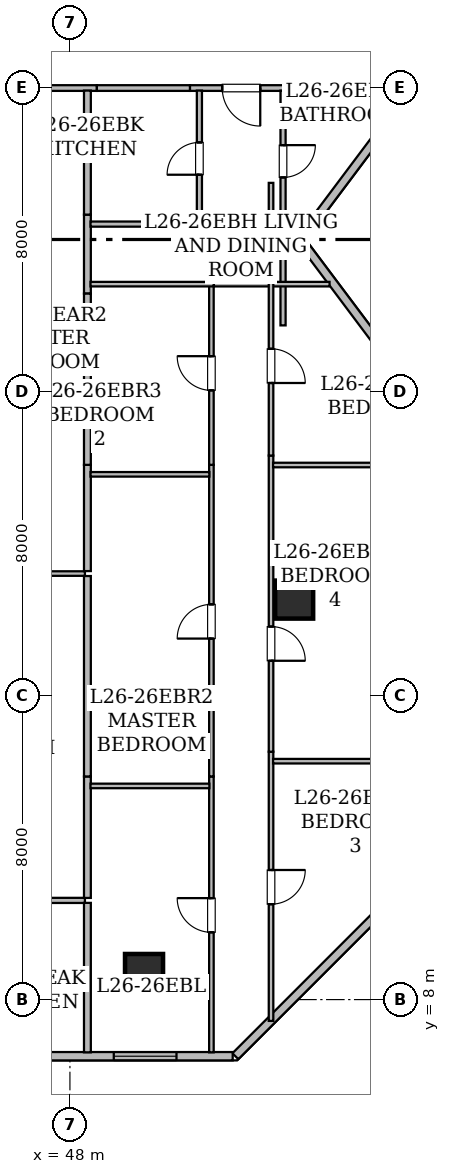
"""IFC4 building model, lengths in metres.
Left out: names, types, materials, properties, quantities, classifications, styles, units other than length and angle.
Written with IfcOpenShell. Run it as: python <this file> out.ifc"""

import sys

from ifc_helpers import new_model, si_unit, direction, frame, frame_2d, origin, origin_2d, place, context, subcontext, project, spatial, rectangle, hollow_rectangle, extrude, element, fill, save


model = new_model("IFC4")
c1 = context("Model", 3, precision=1e-05, world=origin(), true_north=direction((0.0, 1.0)))
c2 = subcontext(c1, "Body", "Model", "MODEL_VIEW")
j1 = project(units=[si_unit("LENGTHUNIT", "METRE"), si_unit("PLANEANGLEUNIT", "RADIAN")], contexts=[c1])
p1 = place(None, origin())
s1 = spatial("IfcSite", under=j1, at=p1, CompositionType="ELEMENT")
p2 = place(p1, origin())
s2 = spatial("IfcBuilding", under=s1, at=p2, CompositionType="ELEMENT")
p3 = place(p2, frame((0.0, 0.0, 105.55)))
s3 = spatial("IfcBuildingStorey", under=s2, at=p3, CompositionType="ELEMENT", Elevation=105.55)
for number, where, z_axis, x_axis in (
    (1, (49.95, 8.7, 0.0), (0.0, 0.0, 1.0), (1.0, 0.0, 0.0)),
    (2, (53.9, 18.525, 0.0), (0.0, 0.0, 1.0), (1.0, 0.0, 0.0)),
):
    element("IfcColumn", number, at=place(p3, frame(where, z_axis=z_axis, x_axis=x_axis)), inside=s3, PredefinedType="COLUMN", context=c2, shape_type="SweptSolid", body=[
        extrude(hollow_rectangle(XDim=1.0, YDim=1.0, WallThickness=0.05, at=origin_2d()), origin(), (0.0, 0.0, 1.0), 3.65),
    ])
p4 = place(p3, frame((56.456, 31.191, 0.0), z_axis=(0.0, 0.0, 1.0), x_axis=(-0.600137081448, -0.799897170561, 0.0)))
e3 = element("IfcWall", 3, at=p4, inside=s3, PredefinedType="STANDARD", context=c2, shape_type="SweptSolid", body=[
    extrude(rectangle(XDim=3.989, YDim=0.22, at=frame_2d((1.995, 0.0))), origin(), (0.0, 0.0, 1.0), 3.43),
])
p5 = place(p3, frame((54.119, 27.924, 0.0), z_axis=(0.0, 0.0, 1.0), x_axis=(0.600039540588, -0.799970343032, 0.0)))
e4 = element("IfcWall", 4, at=p5, inside=s3, PredefinedType="STANDARD", context=c2, shape_type="SweptSolid", body=[
    extrude(rectangle(XDim=3.952, YDim=0.22, at=frame_2d((1.976, 0.0))), origin(), (0.0, 0.0, 1.0), 3.43),
])
p6 = place(p3, frame((56.44, 10.596, 0.0), z_axis=(0.0, 0.0, 1.0), x_axis=(-0.707106781187, -0.707106781187, 0.0)))
e5 = element("IfcWall", 5, at=p6, inside=s3, PredefinedType="STANDARD", context=c2, shape_type="SweptSolid", body=[
    extrude(rectangle(XDim=5.778, YDim=0.22, at=frame_2d((2.889, 0.0))), origin(), (0.0, 0.0, 1.0), 3.43),
])
p7 = place(p3, frame((52.283, 6.51, 0.0), z_axis=(0.0, 0.0, 1.0), x_axis=(-1.0, 0.0, 0.0)))
e6 = element("IfcWall", 6, at=p7, inside=s3, PredefinedType="STANDARD", context=c2, shape_type="SweptSolid", body=[
    extrude(rectangle(XDim=38.568, YDim=0.22, at=frame_2d((19.284, 0.0))), origin(), (0.0, 0.0, 1.0), 3.43),
])
p8 = place(p7, frame((21.108, 0.0, 0.85)))
e7 = element("IfcOpeningElement", 7, at=p8, cuts=e6, PredefinedType="OPENING", context=c2, shape_type="SweptSolid", body=[
    extrude(rectangle(XDim=1.65, YDim=1.55, at=frame_2d((0.825, 0.775))), frame((0.0, 0.12, 0.0), z_axis=(0.0, -1.0, 0.0), x_axis=(1.0, 0.0, 0.0)), (0.0, 0.0, 1.0), 0.24),
])
p9 = place(p7, frame((35.355, 0.0, 0.85)))
e8 = element("IfcOpeningElement", 8, at=p9, cuts=e6, PredefinedType="OPENING", context=c2, shape_type="SweptSolid", body=[
    extrude(rectangle(XDim=1.65, YDim=1.55, at=frame_2d((0.825, 0.775))), frame((0.0, 0.12, 0.0), z_axis=(0.0, -1.0, 0.0), x_axis=(1.0, 0.0, 0.0)), (0.0, 0.0, 1.0), 0.24),
])
p10 = place(p7, frame((29.413, 0.0, 0.8)))
e9 = element("IfcOpeningElement", 9, at=p10, cuts=e6, PredefinedType="OPENING", context=c2, shape_type="SweptSolid", body=[
    extrude(rectangle(XDim=1.2, YDim=1.5, at=frame_2d((0.6, 0.75))), frame((0.0, 0.12, 0.0), z_axis=(0.0, -1.0, 0.0), x_axis=(1.0, 0.0, 0.0)), (0.0, 0.0, 1.0), 0.24),
])
p11 = place(p7, frame((31.863, 0.0, 0.85)))
e10 = element("IfcOpeningElement", 10, at=p11, cuts=e6, PredefinedType="OPENING", context=c2, shape_type="SweptSolid", body=[
    extrude(rectangle(XDim=1.65, YDim=1.55, at=frame_2d((0.825, 0.775))), frame((0.0, 0.12, 0.0), z_axis=(0.0, -1.0, 0.0), x_axis=(1.0, 0.0, 0.0)), (0.0, 0.0, 1.0), 0.24),
])
p12 = place(p7, frame((26.513, 0.0, 0.85)))
e11 = element("IfcOpeningElement", 11, at=p12, cuts=e6, PredefinedType="OPENING", context=c2, shape_type="SweptSolid", body=[
    extrude(rectangle(XDim=1.65, YDim=1.55, at=frame_2d((0.825, 0.775))), frame((0.0, 0.12, 0.0), z_axis=(0.0, -1.0, 0.0), x_axis=(1.0, 0.0, 0.0)), (0.0, 0.0, 1.0), 0.24),
])
p13 = place(p7, frame((13.843, 0.0, 0.85)))
e12 = element("IfcOpeningElement", 12, at=p13, cuts=e6, PredefinedType="OPENING", context=c2, shape_type="SweptSolid", body=[
    extrude(rectangle(XDim=1.65, YDim=1.55, at=frame_2d((0.825, 0.775))), frame((0.0, 0.12, 0.0), z_axis=(0.0, -1.0, 0.0), x_axis=(1.0, 0.0, 0.0)), (0.0, 0.0, 1.0), 0.24),
])
p14 = place(p7, frame((1.479, 0.0, 0.85)))
e13 = element("IfcOpeningElement", 13, at=p14, cuts=e6, PredefinedType="OPENING", context=c2, shape_type="SweptSolid", body=[
    extrude(rectangle(XDim=1.65, YDim=1.55, at=frame_2d((0.825, 0.775))), frame((0.0, 0.12, 0.0), z_axis=(0.0, -1.0, 0.0), x_axis=(1.0, 0.0, 0.0)), (0.0, 0.0, 1.0), 0.24),
])
p15 = place(p3, frame((48.709, 31.985, 0.0), z_axis=(0.0, 0.0, 1.0), x_axis=(-1.0, 0.0, 0.0)))
e14 = element("IfcWall", 14, at=p15, inside=s3, PredefinedType="STANDARD", context=c2, shape_type="SweptSolid", body=[
    extrude(rectangle(XDim=3.906, YDim=0.15, at=frame_2d((1.953, 0.0))), origin(), (0.0, 0.0, 1.0), 2.647),
])
p16 = place(p3, frame((53.857, 31.985, 0.0), z_axis=(0.0, 0.0, 1.0), x_axis=(-1.0, 0.0, 0.0)))
e15 = element("IfcWall", 15, at=p16, inside=s3, PredefinedType="STANDARD", context=c2, shape_type="SweptSolid", body=[
    extrude(rectangle(XDim=2.699, YDim=0.15, at=frame_2d((1.35, 0.0))), origin(), (0.0, 0.0, 1.0), 2.876),
])
p17 = place(p16, frame((0.849, 0.0, 0.0)))
e16 = element("IfcOpeningElement", 16, at=p17, cuts=e15, PredefinedType="OPENING", context=c2, shape_type="SweptSolid", body=[
    extrude(rectangle(XDim=1.0, YDim=2.15, at=frame_2d((0.5, 1.075))), frame((0.0, 0.085, 0.0), z_axis=(0.0, -1.0, 0.0), x_axis=(1.0, 0.0, 0.0)), (0.0, 0.0, 1.0), 0.17),
])
p18 = place(p3, frame((56.388, 31.985, 0.0), z_axis=(0.0, 0.0, 1.0), x_axis=(-1.0, 0.0, 0.0)))
e17 = element("IfcWall", 17, at=p18, inside=s3, PredefinedType="STANDARD", context=c2, shape_type="SweptSolid", body=[
    extrude(rectangle(XDim=2.531, YDim=0.15, at=frame_2d((1.266, 0.0))), origin(), (0.0, 0.0, 1.0), 2.876),
])
p19 = place(p3, frame((51.158, 31.985, 0.0), z_axis=(0.0, 0.0, 1.0), x_axis=(-1.0, 0.0, 0.0)))
e18 = element("IfcWall", 18, at=p19, inside=s3, PredefinedType="STANDARD", context=c2, shape_type="SweptSolid", body=[
    extrude(rectangle(XDim=2.449, YDim=0.15, at=frame_2d((1.225, 0.0))), origin(), (0.0, 0.0, 1.0), 3.43),
])
p20 = place(p3, frame((44.803, 19.21, 0.0), z_axis=(0.0, 0.0, 1.0), x_axis=(1.0, 0.0, 0.0)))
e19 = element("IfcWall", 19, at=p20, inside=s3, PredefinedType="PARTITIONING", context=c2, shape_type="SweptSolid", body=[
    extrude(rectangle(XDim=3.592, YDim=0.12, at=frame_2d((1.796, 0.0))), origin(), (0.0, 0.0, 1.0), 2.647),
])
p21 = place(p20, frame((0.397, 0.0, 0.0)))
e20 = element("IfcOpeningElement", 20, at=p21, cuts=e19, PredefinedType="OPENING", context=c2, shape_type="SweptSolid", body=[
    extrude(rectangle(XDim=0.9, YDim=2.1, at=frame_2d((0.45, 1.05))), frame((0.0, 0.07, 0.0), z_axis=(0.0, -1.0, 0.0), x_axis=(1.0, 0.0, 0.0)), (0.0, 0.0, 1.0), 0.14),
])
p22 = place(p3, frame((48.395, 10.61, 0.0), z_axis=(0.0, 0.0, 1.0), x_axis=(-1.0, 0.0, 0.0)))
e21 = element("IfcWall", 21, at=p22, inside=s3, PredefinedType="PARTITIONING", context=c2, shape_type="SweptSolid", body=[
    extrude(rectangle(XDim=4.166, YDim=0.135, at=frame_2d((2.083, 0.0))), origin(), (0.0, 0.0, 1.0), 3.43),
])
p23 = place(p22, frame((1.658, 0.0, 0.0)))
e22 = element("IfcOpeningElement", 22, at=p23, cuts=e21, PredefinedType="OPENING", context=c2, shape_type="SweptSolid", body=[
    extrude(rectangle(XDim=0.85, YDim=2.1, at=frame_2d((0.425, 1.05))), frame((0.0, 0.077, 0.0), z_axis=(0.0, -1.0, 0.0), x_axis=(1.0, 0.0, 0.0)), (0.0, 0.0, 1.0), 0.155),
])
p24 = place(p3, frame((48.46, 13.871, 0.0), z_axis=(0.0, 0.0, 1.0), x_axis=(0.0, -1.0, 0.0)))
e23 = element("IfcWall", 23, at=p24, inside=s3, PredefinedType="STANDARD", context=c2, shape_type="SweptSolid", body=[
    extrude(rectangle(XDim=3.196, YDim=0.18, at=frame_2d((1.598, 0.0))), origin(), (0.0, 0.0, 1.0), 2.647),
])
p25 = place(p3, frame((48.46, 19.145, 0.0), z_axis=(0.0, 0.0, 1.0), x_axis=(0.0, -1.0, 0.0)))
e24 = element("IfcWall", 24, at=p25, inside=s3, PredefinedType="STANDARD", context=c2, shape_type="SweptSolid", body=[
    extrude(rectangle(XDim=5.274, YDim=0.18, at=frame_2d((2.637, 0.0))), origin(), (0.0, 0.0, 1.0), 2.647),
])
p26 = place(p3, frame((48.46, 28.654, 0.0), z_axis=(0.0, 0.0, 1.0), x_axis=(0.0, -1.0, 0.0)))
e25 = element("IfcWall", 25, at=p26, inside=s3, PredefinedType="STANDARD", context=c2, shape_type="SweptSolid", body=[
    extrude(rectangle(XDim=2.078, YDim=0.18, at=frame_2d((1.039, 0.0))), origin(), (0.0, 0.0, 1.0), 3.43),
])
p27 = place(p3, frame((48.46, 31.918, 0.0), z_axis=(0.0, 0.0, 1.0), x_axis=(0.0, -1.0, 0.0)))
e26 = element("IfcWall", 26, at=p27, inside=s3, PredefinedType="STANDARD", context=c2, shape_type="SweptSolid", body=[
    extrude(rectangle(XDim=3.264, YDim=0.18, at=frame_2d((1.632, 0.0))), origin(), (0.0, 0.0, 1.0), 3.43),
])
p28 = place(p3, frame((48.46, 22.07, 0.0), z_axis=(0.0, 0.0, 1.0), x_axis=(0.0, -1.0, 0.0)))
e27 = element("IfcWall", 27, at=p28, inside=s3, PredefinedType="STANDARD", context=c2, shape_type="SweptSolid", body=[
    extrude(rectangle(XDim=2.795, YDim=0.18, at=frame_2d((1.397, 0.0))), origin(), (0.0, 0.0, 1.0), 3.43),
])
p29 = place(p3, frame((48.46, 26.576, 0.0), z_axis=(0.0, 0.0, 1.0), x_axis=(0.0, -1.0, 0.0)))
e28 = element("IfcWall", 28, at=p29, inside=s3, PredefinedType="STANDARD", context=c2, shape_type="SweptSolid", body=[
    extrude(rectangle(XDim=4.506, YDim=0.18, at=frame_2d((2.253, 0.0))), origin(), (0.0, 0.0, 1.0), 3.43),
])
p30 = place(p3, frame((48.46, 10.545, 0.0), z_axis=(0.0, 0.0, 1.0), x_axis=(0.0, -1.0, 0.0)))
e29 = element("IfcWall", 29, at=p30, inside=s3, PredefinedType="STANDARD", context=c2, shape_type="SweptSolid", body=[
    extrude(rectangle(XDim=3.933, YDim=0.18, at=frame_2d((1.966, 0.0))), origin(), (0.0, 0.0, 1.0), 2.876),
])
p31 = place(p3, frame((53.608, 31.918, 0.0), z_axis=(0.0, 0.0, 1.0), x_axis=(0.0, -1.0, 0.0)))
e30 = element("IfcWall", 30, at=p31, inside=s3, PredefinedType="PARTITIONING", context=c2, shape_type="SweptSolid", body=[
    extrude(rectangle(XDim=6.178, YDim=0.135, at=frame_2d((3.089, 0.0))), origin(), (0.0, 0.0, 1.0), 2.876),
])
p32 = place(p31, frame((1.435, 0.0, 0.0)))
e31 = element("IfcOpeningElement", 31, at=p32, cuts=e30, PredefinedType="OPENING", context=c2, shape_type="SweptSolid", body=[
    extrude(rectangle(XDim=0.85, YDim=2.1, at=frame_2d((0.425, 1.05))), frame((0.0, 0.077, 0.0), z_axis=(0.0, -1.0, 0.0), x_axis=(1.0, 0.0, 0.0)), (0.0, 0.0, 1.0), 0.155),
])
p33 = place(p3, frame((50.943, 28.405, 0.0), z_axis=(0.0, 0.0, 1.0), x_axis=(1.0, 0.0, 0.0)))
e32 = element("IfcWall", 32, at=p33, inside=s3, PredefinedType="PARTITIONING", context=c2, shape_type="SweptSolid", body=[
    extrude(rectangle(XDim=3.311, YDim=0.135, at=frame_2d((1.655, 0.0))), origin(), (0.0, 0.0, 1.0), 2.876),
])
p34 = place(p3, frame((48.542, 28.405, 0.0), z_axis=(0.0, 0.0, 1.0), x_axis=(1.0, 0.0, 0.0)))
e33 = element("IfcWall", 33, at=p34, inside=s3, PredefinedType="PARTITIONING", context=c2, shape_type="SweptSolid", body=[
    extrude(rectangle(XDim=2.401, YDim=0.135, at=frame_2d((1.201, 0.0))), origin(), (0.0, 0.0, 1.0), 3.43),
])
p35 = place(p3, frame((51.407, 28.34, 0.0), z_axis=(0.0, 0.0, 1.0), x_axis=(0.0, 1.0, 0.0)))
e34 = element("IfcWall", 34, at=p35, inside=s3, PredefinedType="PARTITIONING", context=c2, shape_type="SweptSolid", body=[
    extrude(rectangle(XDim=3.578, YDim=0.135, at=frame_2d((1.789, 0.0))), origin(), (0.0, 0.0, 1.0), 3.43),
])
p36 = place(p35, frame((1.364, 0.0, 0.0)))
e35 = element("IfcOpeningElement", 35, at=p36, cuts=e34, PredefinedType="OPENING", context=c2, shape_type="SweptSolid", body=[
    extrude(rectangle(XDim=0.85, YDim=2.1, at=frame_2d((0.425, 1.05))), frame((0.0, 0.077, 0.0), z_axis=(0.0, -1.0, 0.0), x_axis=(1.0, 0.0, 0.0)), (0.0, 0.0, 1.0), 0.155),
])
p37 = place(p3, frame((51.723, 6.612, 0.0), z_axis=(0.0, 0.0, 1.0), x_axis=(0.0, 1.0, 0.0)))
e36 = element("IfcWall", 36, at=p37, inside=s3, PredefinedType="PARTITIONING", context=c2, shape_type="SweptSolid", body=[
    extrude(rectangle(XDim=7.259, YDim=0.12, at=frame_2d((3.629, 0.0))), origin(), (0.0, 0.0, 1.0), 2.876),
])
p38 = place(p37, frame((3.158, 0.0, 0.0)))
e37 = element("IfcOpeningElement", 37, at=p38, cuts=e36, PredefinedType="OPENING", context=c2, shape_type="SweptSolid", body=[
    extrude(rectangle(XDim=0.9, YDim=2.1, at=frame_2d((0.45, 1.05))), frame((0.0, 0.07, 0.0), z_axis=(0.0, -1.0, 0.0), x_axis=(1.0, 0.0, 0.0)), (0.0, 0.0, 1.0), 0.14),
])
p39 = place(p3, frame((51.723, 13.871, 0.0), z_axis=(0.0, 0.0, 1.0), x_axis=(0.0, 1.0, 0.0)))
e38 = element("IfcWall", 38, at=p39, inside=s3, PredefinedType="PARTITIONING", context=c2, shape_type="SweptSolid", body=[
    extrude(rectangle(XDim=8.199, YDim=0.12, at=frame_2d((4.1, 0.0))), origin(), (0.0, 0.0, 1.0), 2.647),
])
p40 = place(p39, frame((3.628, 0.0, 0.0)))
e39 = element("IfcOpeningElement", 39, at=p40, cuts=e38, PredefinedType="OPENING", context=c2, shape_type="SweptSolid", body=[
    extrude(rectangle(XDim=0.9, YDim=2.1, at=frame_2d((0.45, 1.05))), frame((0.0, 0.07, 0.0), z_axis=(0.0, -1.0, 0.0), x_axis=(1.0, 0.0, 0.0)), (0.0, 0.0, 1.0), 0.14),
])
p41 = place(p3, frame((51.723, 22.07, 0.0), z_axis=(0.0, 0.0, 1.0), x_axis=(0.0, 1.0, 0.0)))
e40 = element("IfcWall", 40, at=p41, inside=s3, PredefinedType="PARTITIONING", context=c2, shape_type="SweptSolid", body=[
    extrude(rectangle(XDim=4.82, YDim=0.12, at=frame_2d((2.41, 0.0))), origin(), (0.0, 0.0, 1.0), 3.43),
])
p42 = place(p41, frame((1.96, 0.0, 0.0)))
e41 = element("IfcOpeningElement", 41, at=p42, cuts=e40, PredefinedType="OPENING", context=c2, shape_type="SweptSolid", body=[
    extrude(rectangle(XDim=0.9, YDim=2.1, at=frame_2d((0.45, 1.05))), frame((0.0, 0.07, 0.0), z_axis=(0.0, -1.0, 0.0), x_axis=(1.0, 0.0, 0.0)), (0.0, 0.0, 1.0), 0.14),
])
p43 = place(p3, frame((51.788, 26.825, 0.0), z_axis=(0.0, 0.0, 1.0), x_axis=(-1.0, 0.0, 0.0)))
e42 = element("IfcWall", 42, at=p43, inside=s3, PredefinedType="PARTITIONING", context=c2, shape_type="SweptSolid", body=[
    extrude(rectangle(XDim=3.246, YDim=0.12, at=frame_2d((1.623, 0.0))), origin(), (0.0, 0.0, 1.0), 3.43),
])
p44 = place(p3, frame((53.292, 14.522, 0.0), z_axis=(0.0, 0.0, 1.0), x_axis=(0.0, -1.0, 0.0)))
e43 = element("IfcWall", 43, at=p44, inside=s3, PredefinedType="PARTITIONING", context=c2, shape_type="SweptSolid", body=[
    extrude(rectangle(XDim=7.083, YDim=0.12, at=frame_2d((3.542, 0.0))), origin(), (0.0, 0.0, 1.0), 3.43),
])
p45 = place(p44, frame((3.112, 0.0, 0.0)))
e44 = element("IfcOpeningElement", 44, at=p45, cuts=e43, PredefinedType="OPENING", context=c2, shape_type="SweptSolid", body=[
    extrude(rectangle(XDim=0.9, YDim=2.1, at=frame_2d((0.45, 1.05))), frame((0.0, 0.07, 0.0), z_axis=(0.0, -1.0, 0.0), x_axis=(1.0, 0.0, 0.0)), (0.0, 0.0, 1.0), 0.14),
])
p46 = place(p3, frame((53.292, 22.315, 0.0), z_axis=(0.0, 0.0, 1.0), x_axis=(0.0, -1.0, 0.0)))
e45 = element("IfcWall", 45, at=p46, inside=s3, PredefinedType="PARTITIONING", context=c2, shape_type="SweptSolid", body=[
    extrude(rectangle(XDim=7.793, YDim=0.12, at=frame_2d((3.896, 0.0))), origin(), (0.0, 0.0, 1.0), 2.647),
])
p47 = place(p46, frame((4.5, 0.0, 0.0)))
e46 = element("IfcOpeningElement", 46, at=p47, cuts=e45, PredefinedType="OPENING", context=c2, shape_type="SweptSolid", body=[
    extrude(rectangle(XDim=0.9, YDim=2.1, at=frame_2d((0.45, 1.05))), frame((0.0, 0.07, 0.0), z_axis=(0.0, -1.0, 0.0), x_axis=(1.0, 0.0, 0.0)), (0.0, 0.0, 1.0), 0.14),
])
p48 = place(p3, frame((54.832, 26.825, 0.0), z_axis=(0.0, 0.0, 1.0), x_axis=(-1.0, 0.0, 0.0)))
e47 = element("IfcWall", 47, at=p48, inside=s3, PredefinedType="PARTITIONING", context=c2, shape_type="SweptSolid", body=[
    extrude(rectangle(XDim=3.044, YDim=0.12, at=frame_2d((1.522, 0.0))), origin(), (0.0, 0.0, 1.0), 2.876),
])
p49 = place(p3, frame((53.292, 29.49, 0.0), z_axis=(0.0, 0.0, 1.0), x_axis=(0.0, -1.0, 0.0)))
e48 = element("IfcWall", 48, at=p49, inside=s3, PredefinedType="PARTITIONING", context=c2, shape_type="SweptSolid", body=[
    extrude(rectangle(XDim=7.175, YDim=0.12, at=frame_2d((3.587, 0.0))), origin(), (0.0, 0.0, 1.0), 3.43),
])
p50 = place(p49, frame((4.366, 0.0, 0.0)))
e49 = element("IfcOpeningElement", 49, at=p50, cuts=e48, PredefinedType="OPENING", context=c2, shape_type="SweptSolid", body=[
    extrude(rectangle(XDim=0.9, YDim=2.1, at=frame_2d((0.45, 1.05))), frame((0.0, 0.07, 0.0), z_axis=(0.0, -1.0, 0.0), x_axis=(1.0, 0.0, 0.0)), (0.0, 0.0, 1.0), 0.14),
])
for number, where, z_axis, x_axis in (
    (50, (48.542, 13.622, 0.0), (0.0, 0.0, 1.0), (1.0, 0.0, 0.0)),
    (51, (48.542, 21.821, 0.0), (0.0, 0.0, 1.0), (1.0, 0.0, 0.0)),
):
    element("IfcWall", number, at=place(p3, frame(where, z_axis=z_axis, x_axis=x_axis)), inside=s3, PredefinedType="PARTITIONING", context=c2, shape_type="SweptSolid", body=[
        extrude(rectangle(XDim=3.127, YDim=0.12, at=frame_2d((1.563, 0.0))), origin(), (0.0, 0.0, 1.0), 3.43),
    ])
p51 = place(p3, frame((53.346, 14.273, 0.0), z_axis=(0.0, 0.0, 1.0), x_axis=(1.0, 0.0, 0.0)))
e52 = element("IfcWall", 52, at=p51, inside=s3, PredefinedType="PARTITIONING", context=c2, shape_type="SweptSolid", body=[
    extrude(rectangle(XDim=3.042, YDim=0.12, at=frame_2d((1.521, 0.0))), origin(), (0.0, 0.0, 1.0), 3.43),
])
p52 = place(p3, frame((53.346, 22.066, 0.0), z_axis=(0.0, 0.0, 1.0), x_axis=(1.0, 0.0, 0.0)))
e53 = element("IfcWall", 53, at=p52, inside=s3, PredefinedType="PARTITIONING", context=c2, shape_type="SweptSolid", body=[
    extrude(rectangle(XDim=3.042, YDim=0.12, at=frame_2d((1.521, 0.0))), origin(), (0.0, 0.0, 1.0), 2.876),
])
p53 = place(p14, origin())
e54 = element("IfcWindow", 54, at=p53, inside=s3, PartitioningType="SINGLE_PANEL", PredefinedType="WINDOW", context=c2, shape_type="SweptSolid", body=[
    extrude(rectangle(XDim=1.65, YDim=1.55, at=frame_2d((0.825, 0.775))), frame((0.0, 0.03, 0.0), z_axis=(0.0, -1.0, 0.0), x_axis=(1.0, 0.0, 0.0)), (0.0, 0.0, 1.0), 0.06),
])
fill(e13, e54)
p54 = place(p17, origin())
e55 = element("IfcDoor", 55, at=p54, inside=s3, OperationType="SINGLE_SWING_LEFT", PredefinedType="DOOR", context=c2, shape_type="SweptSolid", body=[
    extrude(rectangle(XDim=1.0, YDim=2.15, at=frame_2d((0.5, 1.075))), frame((0.0, 0.025, 0.0), z_axis=(0.0, -1.0, 0.0), x_axis=(1.0, 0.0, 0.0)), (0.0, 0.0, 1.0), 0.05),
])
fill(e16, e55)
p55 = place(p32, origin())
e56 = element("IfcDoor", 56, at=p55, inside=s3, OperationType="SINGLE_SWING_LEFT", PredefinedType="DOOR", context=c2, shape_type="SweptSolid", body=[
    extrude(rectangle(XDim=0.85, YDim=2.1, at=frame_2d((0.425, 1.05))), frame((0.0, 0.025, 0.0), z_axis=(0.0, -1.0, 0.0), x_axis=(1.0, 0.0, 0.0)), (0.0, 0.0, 1.0), 0.05),
])
fill(e31, e56)
p56 = place(p36, origin())
e57 = element("IfcDoor", 57, at=p56, inside=s3, OperationType="SINGLE_SWING_LEFT", PredefinedType="DOOR", context=c2, shape_type="SweptSolid", body=[
    extrude(rectangle(XDim=0.85, YDim=2.1, at=frame_2d((0.425, 1.05))), frame((0.0, 0.025, 0.0), z_axis=(0.0, -1.0, 0.0), x_axis=(1.0, 0.0, 0.0)), (0.0, 0.0, 1.0), 0.05),
])
fill(e35, e57)
p57 = place(p38, origin())
e58 = element("IfcDoor", 58, at=p57, inside=s3, OperationType="SINGLE_SWING_RIGHT", PredefinedType="DOOR", context=c2, shape_type="SweptSolid", body=[
    extrude(rectangle(XDim=0.9, YDim=2.1, at=frame_2d((0.45, 1.05))), frame((0.0, 0.025, 0.0), z_axis=(0.0, -1.0, 0.0), x_axis=(1.0, 0.0, 0.0)), (0.0, 0.0, 1.0), 0.05),
])
fill(e37, e58)
p58 = place(p40, origin())
e59 = element("IfcDoor", 59, at=p58, inside=s3, OperationType="SINGLE_SWING_LEFT", PredefinedType="DOOR", context=c2, shape_type="SweptSolid", body=[
    extrude(rectangle(XDim=0.9, YDim=2.1, at=frame_2d((0.45, 1.05))), frame((0.0, 0.025, 0.0), z_axis=(0.0, -1.0, 0.0), x_axis=(1.0, 0.0, 0.0)), (0.0, 0.0, 1.0), 0.05),
])
fill(e39, e59)
p59 = place(p42, origin())
e60 = element("IfcDoor", 60, at=p59, inside=s3, OperationType="SINGLE_SWING_RIGHT", PredefinedType="DOOR", context=c2, shape_type="SweptSolid", body=[
    extrude(rectangle(XDim=0.9, YDim=2.1, at=frame_2d((0.45, 1.05))), frame((0.0, 0.025, 0.0), z_axis=(0.0, -1.0, 0.0), x_axis=(1.0, 0.0, 0.0)), (0.0, 0.0, 1.0), 0.05),
])
fill(e41, e60)
p60 = place(p45, origin())
e61 = element("IfcDoor", 61, at=p60, inside=s3, OperationType="SINGLE_SWING_LEFT", PredefinedType="DOOR", context=c2, shape_type="SweptSolid", body=[
    extrude(rectangle(XDim=0.9, YDim=2.1, at=frame_2d((0.45, 1.05))), frame((0.0, 0.025, 0.0), z_axis=(0.0, -1.0, 0.0), x_axis=(1.0, 0.0, 0.0)), (0.0, 0.0, 1.0), 0.05),
])
fill(e44, e61)
p61 = place(p47, origin())
e62 = element("IfcDoor", 62, at=p61, inside=s3, OperationType="SINGLE_SWING_RIGHT", PredefinedType="DOOR", context=c2, shape_type="SweptSolid", body=[
    extrude(rectangle(XDim=0.9, YDim=2.1, at=frame_2d((0.45, 1.05))), frame((0.0, 0.025, 0.0), z_axis=(0.0, -1.0, 0.0), x_axis=(1.0, 0.0, 0.0)), (0.0, 0.0, 1.0), 0.05),
])
fill(e46, e62)
p62 = place(p50, origin())
e63 = element("IfcDoor", 63, at=p62, inside=s3, OperationType="SINGLE_SWING_RIGHT", PredefinedType="DOOR", context=c2, shape_type="SweptSolid", body=[
    extrude(rectangle(XDim=0.9, YDim=2.1, at=frame_2d((0.45, 1.05))), frame((0.0, 0.025, 0.0), z_axis=(0.0, -1.0, 0.0), x_axis=(1.0, 0.0, 0.0)), (0.0, 0.0, 1.0), 0.05),
])
fill(e49, e63)
save(model, sys.argv[1])
